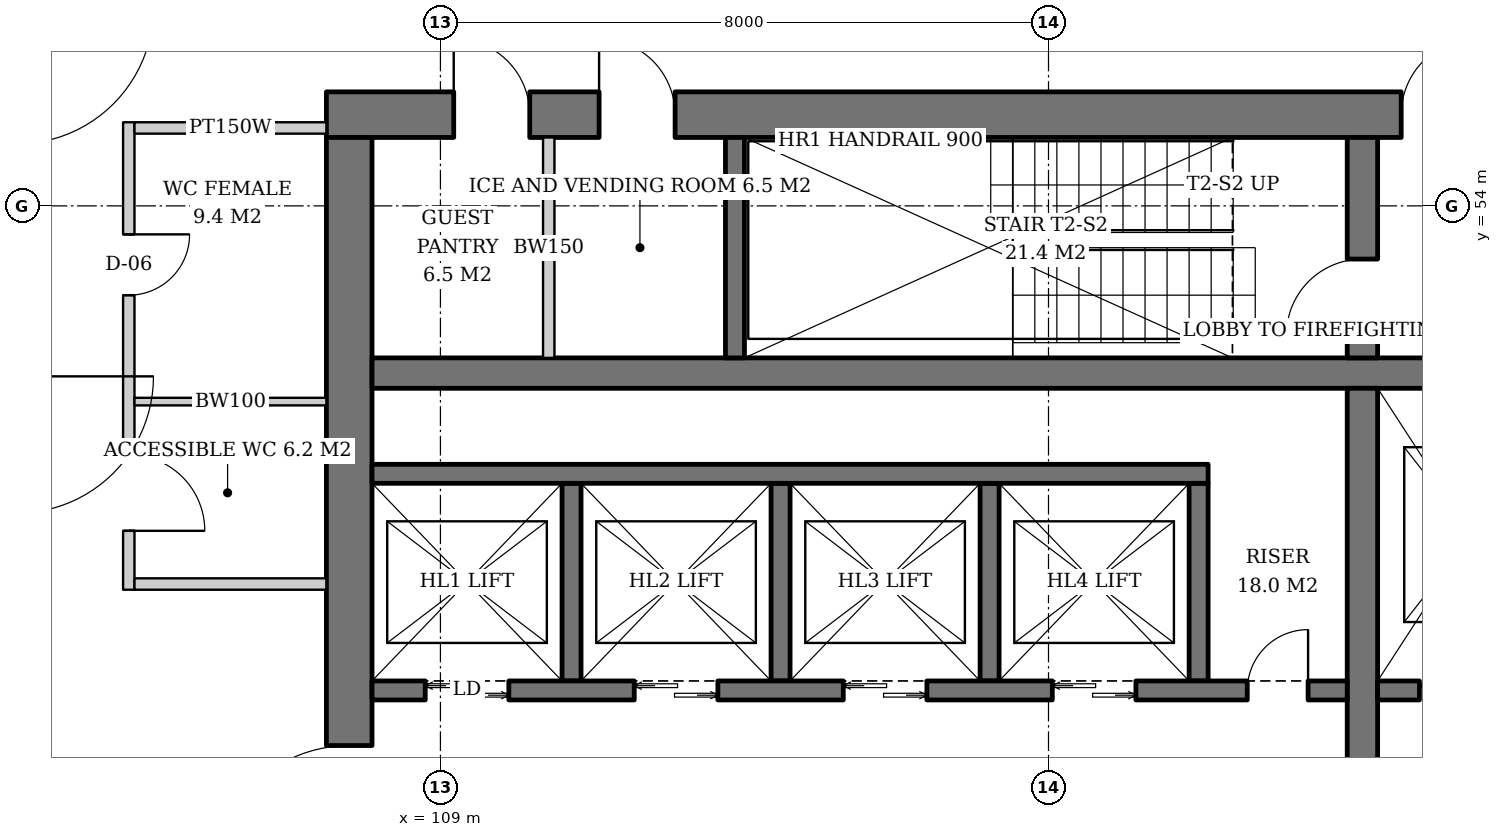
"""IFC4 building model, lengths in metres.
Left out: names, types, materials, properties, quantities, classifications, styles, units other than length and angle.
Written with IfcOpenShell. Run it as: python <this file> out.ifc"""

import sys

from ifc_helpers import new_model, si_unit, direction, frame, frame_2d, origin, place, context, subcontext, project, spatial, rectangle, extrude, element, fill, save


model = new_model("IFC4")
c1 = context("Model", 3, precision=1e-05, world=origin(), true_north=direction((0.0, 1.0)))
c2 = subcontext(c1, "Body", "Model", "MODEL_VIEW")
j1 = project(units=[si_unit("LENGTHUNIT", "METRE"), si_unit("PLANEANGLEUNIT", "RADIAN")], contexts=[c1])
p1 = place(None, origin())
s1 = spatial("IfcSite", under=j1, at=p1, CompositionType="ELEMENT")
p2 = place(p1, origin())
s2 = spatial("IfcBuilding", under=s1, at=p2, CompositionType="ELEMENT")
p3 = place(p2, frame((0.0, 0.0, 21.0)))
s3 = spatial("IfcBuildingStorey", under=s2, at=p3, CompositionType="ELEMENT", Elevation=21.0)
p4 = place(p3, frame((107.5, 55.2, 0.0), z_axis=(0.0, 0.0, 1.0), x_axis=(1.0, 0.0, 0.0)))
e1 = element("IfcWall", 1, at=p4, inside=s3, PredefinedType="SHEAR", context=c2, shape_type="SweptSolid", body=[
    extrude(rectangle(XDim=19.0, YDim=0.6, at=frame_2d((9.5, 0.0))), origin(), (0.0, 0.0, 1.0), 3.8),
])
p5 = place(p4, frame((14.14, 0.0, 0.0)))
e2 = element("IfcOpeningElement", 2, at=p5, cuts=e1, PredefinedType="OPENING", context=c2, shape_type="SweptSolid", body=[
    extrude(rectangle(XDim=1.0, YDim=2.1, at=frame_2d((0.5, 1.05))), frame((0.0, 0.31, 0.0), z_axis=(0.0, -1.0, 0.0), x_axis=(1.0, 0.0, 0.0)), (0.0, 0.0, 1.0), 0.62),
])
p6 = place(p4, frame((1.675, 0.0, 0.0)))
e3 = element("IfcOpeningElement", 3, at=p6, cuts=e1, PredefinedType="OPENING", context=c2, shape_type="SweptSolid", body=[
    extrude(rectangle(XDim=1.0, YDim=2.1, at=frame_2d((0.5, 1.05))), frame((0.0, 0.31, 0.0), z_axis=(0.0, -1.0, 0.0), x_axis=(1.0, 0.0, 0.0)), (0.0, 0.0, 1.0), 0.62),
])
p7 = place(p4, frame((3.587, 0.0, 0.0)))
e4 = element("IfcOpeningElement", 4, at=p7, cuts=e1, PredefinedType="OPENING", context=c2, shape_type="SweptSolid", body=[
    extrude(rectangle(XDim=1.0, YDim=2.1, at=frame_2d((0.5, 1.05))), frame((0.0, 0.31, 0.0), z_axis=(0.0, -1.0, 0.0), x_axis=(1.0, 0.0, 0.0)), (0.0, 0.0, 1.0), 0.62),
])
p8 = place(p3, frame((107.8, 37.1, 0.0), z_axis=(0.0, 0.0, 1.0), x_axis=(0.0, 1.0, 0.0)))
e5 = element("IfcWall", 5, at=p8, inside=s3, PredefinedType="SHEAR", context=c2, shape_type="SweptSolid", body=[
    extrude(rectangle(XDim=17.8, YDim=0.6, at=frame_2d((8.9, 0.0))), origin(), (0.0, 0.0, 1.0), 3.8),
])
p9 = place(p8, frame((8.0, 0.0, 0.0)))
e6 = element("IfcOpeningElement", 6, at=p9, cuts=e5, PredefinedType="OPENING", context=c2, shape_type="SweptSolid", body=[
    extrude(rectangle(XDim=1.8, YDim=2.4, at=frame_2d((0.9, 1.2))), frame((0.0, 0.31, 0.0), z_axis=(0.0, -1.0, 0.0), x_axis=(1.0, 0.0, 0.0)), (0.0, 0.0, 1.0), 0.62),
])
p10 = place(p3, frame((108.1, 51.8, 0.0), z_axis=(0.0, 0.0, 1.0), x_axis=(1.0, 0.0, 0.0)))
e7 = element("IfcWall", 7, at=p10, inside=s3, PredefinedType="SHEAR", context=c2, shape_type="SweptSolid", body=[
    extrude(rectangle(XDim=17.8, YDim=0.4, at=frame_2d((8.9, 0.0))), origin(), (0.0, 0.0, 1.0), 3.8),
])
p11 = place(p3, frame((121.13, 40.4, 0.0), z_axis=(0.0, 0.0, 1.0), x_axis=(0.0, 1.0, 0.0)))
e8 = element("IfcWall", 8, at=p11, inside=s3, PredefinedType="SHEAR", context=c2, shape_type="SweptSolid", body=[
    extrude(rectangle(XDim=11.2, YDim=0.4, at=frame_2d((5.6, 0.0))), origin(), (0.0, 0.0, 1.0), 3.8),
])
p12 = place(p3, frame((121.13, 52.0, 0.0), z_axis=(0.0, 0.0, 1.0), x_axis=(0.0, 1.0, 0.0)))
e9 = element("IfcWall", 9, at=p12, inside=s3, PredefinedType="SHEAR", context=c2, shape_type="SweptSolid", body=[
    extrude(rectangle(XDim=2.9, YDim=0.4, at=frame_2d((1.45, 0.0))), origin(), (0.0, 0.0, 1.0), 3.8),
])
p13 = place(p12, frame((0.3, 0.0, 0.0)))
e10 = element("IfcOpeningElement", 10, at=p13, cuts=e9, PredefinedType="OPENING", context=c2, shape_type="SweptSolid", body=[
    extrude(rectangle(XDim=1.0, YDim=2.1, at=frame_2d((0.5, 1.05))), frame((0.0, 0.21, 0.0), z_axis=(0.0, -1.0, 0.0), x_axis=(1.0, 0.0, 0.0)), (0.0, 0.0, 1.0), 0.42),
])
p14 = place(p3, frame((112.875, 52.0, 0.0), z_axis=(0.0, 0.0, 1.0), x_axis=(0.0, 1.0, 0.0)))
e11 = element("IfcWall", 11, at=p14, inside=s3, PredefinedType="SHEAR", context=c2, shape_type="SweptSolid", body=[
    extrude(rectangle(XDim=2.9, YDim=0.25, at=frame_2d((1.45, 0.0))), origin(), (0.0, 0.0, 1.0), 3.8),
])
for number, where, z_axis, x_axis in (
    (12, (110.725, 47.75, 0.0), (0.0, 0.0, 1.0), (0.0, 1.0, 0.0)),
    (13, (113.475, 47.75, 0.0), (0.0, 0.0, 1.0), (0.0, 1.0, 0.0)),
    (14, (116.225, 47.75, 0.0), (0.0, 0.0, 1.0), (0.0, 1.0, 0.0)),
    (15, (118.975, 47.75, 0.0), (0.0, 0.0, 1.0), (0.0, 1.0, 0.0)),
):
    element("IfcWall", number, at=place(p3, frame(where, z_axis=z_axis, x_axis=x_axis)), inside=s3, PredefinedType="SHEAR", context=c2, shape_type="SweptSolid", body=[
        extrude(rectangle(XDim=2.6, YDim=0.25, at=frame_2d((1.3, 0.0))), origin(), (0.0, 0.0, 1.0), 3.8),
    ])
p15 = place(p3, frame((108.1, 50.475, 0.0), z_axis=(0.0, 0.0, 1.0), x_axis=(1.0, 0.0, 0.0)))
e16 = element("IfcWall", 16, at=p15, inside=s3, PredefinedType="SHEAR", context=c2, shape_type="SweptSolid", body=[
    extrude(rectangle(XDim=11.0, YDim=0.25, at=frame_2d((5.5, 0.0))), origin(), (0.0, 0.0, 1.0), 3.8),
])
p16 = place(p3, frame((108.1, 47.625, 0.0), z_axis=(0.0, 0.0, 1.0), x_axis=(1.0, 0.0, 0.0)))
e17 = element("IfcWall", 17, at=p16, inside=s3, PredefinedType="SHEAR", context=c2, shape_type="SweptSolid", body=[
    extrude(rectangle(XDim=12.83, YDim=0.25, at=frame_2d((6.415, 0.0))), origin(), (0.0, 0.0, 1.0), 3.8),
])
p17 = place(p16, frame((0.7, 0.0, 0.0)))
e18 = element("IfcOpeningElement", 18, at=p17, cuts=e17, PredefinedType="OPENING", context=c2, shape_type="SweptSolid", body=[
    extrude(rectangle(XDim=1.1, YDim=2.2, at=frame_2d((0.55, 1.1))), frame((0.0, 0.135, 0.0), z_axis=(0.0, -1.0, 0.0), x_axis=(1.0, 0.0, 0.0)), (0.0, 0.0, 1.0), 0.27),
])
p18 = place(p16, frame((3.45, 0.0, 0.0)))
e19 = element("IfcOpeningElement", 19, at=p18, cuts=e17, PredefinedType="OPENING", context=c2, shape_type="SweptSolid", body=[
    extrude(rectangle(XDim=1.1, YDim=2.2, at=frame_2d((0.55, 1.1))), frame((0.0, 0.135, 0.0), z_axis=(0.0, -1.0, 0.0), x_axis=(1.0, 0.0, 0.0)), (0.0, 0.0, 1.0), 0.27),
])
p19 = place(p16, frame((6.2, 0.0, 0.0)))
e20 = element("IfcOpeningElement", 20, at=p19, cuts=e17, PredefinedType="OPENING", context=c2, shape_type="SweptSolid", body=[
    extrude(rectangle(XDim=1.1, YDim=2.2, at=frame_2d((0.55, 1.1))), frame((0.0, 0.135, 0.0), z_axis=(0.0, -1.0, 0.0), x_axis=(1.0, 0.0, 0.0)), (0.0, 0.0, 1.0), 0.27),
])
p20 = place(p16, frame((8.95, 0.0, 0.0)))
e21 = element("IfcOpeningElement", 21, at=p20, cuts=e17, PredefinedType="OPENING", context=c2, shape_type="SweptSolid", body=[
    extrude(rectangle(XDim=1.1, YDim=2.2, at=frame_2d((0.55, 1.1))), frame((0.0, 0.135, 0.0), z_axis=(0.0, -1.0, 0.0), x_axis=(1.0, 0.0, 0.0)), (0.0, 0.0, 1.0), 0.27),
])
p21 = place(p16, frame((11.515, 0.0, 0.0)))
e22 = element("IfcOpeningElement", 22, at=p21, cuts=e17, PredefinedType="OPENING", context=c2, shape_type="SweptSolid", body=[
    extrude(rectangle(XDim=0.8, YDim=2.0, at=frame_2d((0.4, 1.0))), frame((0.0, 0.135, 0.0), z_axis=(0.0, -1.0, 0.0), x_axis=(1.0, 0.0, 0.0)), (0.0, 0.0, 1.0), 0.27),
])
p22 = place(p3, frame((121.33, 47.625, 0.0), z_axis=(0.0, 0.0, 1.0), x_axis=(1.0, 0.0, 0.0)))
e23 = element("IfcWall", 23, at=p22, inside=s3, PredefinedType="SHEAR", context=c2, shape_type="SweptSolid", body=[
    extrude(rectangle(XDim=4.57, YDim=0.25, at=frame_2d((2.285, 0.0))), origin(), (0.0, 0.0, 1.0), 3.8),
])
p23 = place(p22, frame((0.55, 0.0, 0.0)))
e24 = element("IfcOpeningElement", 24, at=p23, cuts=e23, PredefinedType="OPENING", context=c2, shape_type="SweptSolid", body=[
    extrude(rectangle(XDim=1.4, YDim=2.4, at=frame_2d((0.7, 1.2))), frame((0.0, 0.135, 0.0), z_axis=(0.0, -1.0, 0.0), x_axis=(1.0, 0.0, 0.0)), (0.0, 0.0, 1.0), 0.27),
])
p24 = place(p22, frame((3.26, 0.0, 0.0)))
e25 = element("IfcOpeningElement", 25, at=p24, cuts=e23, PredefinedType="OPENING", context=c2, shape_type="SweptSolid", body=[
    extrude(rectangle(XDim=0.8, YDim=2.0, at=frame_2d((0.4, 1.0))), frame((0.0, 0.135, 0.0), z_axis=(0.0, -1.0, 0.0), x_axis=(1.0, 0.0, 0.0)), (0.0, 0.0, 1.0), 0.27),
])
p25 = place(p3, frame((110.425, 52.0, 0.0), z_axis=(0.0, 0.0, 1.0), x_axis=(0.0, 1.0, 0.0)))
e26 = element("IfcWall", 26, at=p25, inside=s3, PredefinedType="SOLIDWALL", context=c2, shape_type="SweptSolid", body=[
    extrude(rectangle(XDim=2.9, YDim=0.15, at=frame_2d((1.45, 0.0))), origin(), (0.0, 0.0, 1.0), 3.6),
])
p26 = place(p3, frame((104.9, 55.1, 0.0), z_axis=(0.0, 0.0, 1.0), x_axis=(0.0, -1.0, 0.0)))
e27 = element("IfcWall", 27, at=p26, inside=s3, PredefinedType="PARTITIONING", context=c2, shape_type="SweptSolid", body=[
    extrude(rectangle(XDim=6.15, YDim=0.15, at=frame_2d((3.075, 0.0))), origin(), (0.0, 0.0, 1.0), 2.8),
])
p27 = place(p26, frame((1.475, 0.0, 0.0)))
e28 = element("IfcOpeningElement", 28, at=p27, cuts=e27, PredefinedType="OPENING", context=c2, shape_type="SweptSolid", body=[
    extrude(rectangle(XDim=0.8, YDim=2.1, at=frame_2d((0.4, 1.05))), frame((0.0, 0.085, 0.0), z_axis=(0.0, -1.0, 0.0), x_axis=(1.0, 0.0, 0.0)), (0.0, 0.0, 1.0), 0.17),
])
p28 = place(p26, frame((4.375, 0.0, 0.0)))
e29 = element("IfcOpeningElement", 29, at=p28, cuts=e27, PredefinedType="OPENING", context=c2, shape_type="SweptSolid", body=[
    extrude(rectangle(XDim=1.0, YDim=2.1, at=frame_2d((0.5, 1.05))), frame((0.0, 0.085, 0.0), z_axis=(0.0, -1.0, 0.0), x_axis=(1.0, 0.0, 0.0)), (0.0, 0.0, 1.0), 0.17),
])
p29 = place(p3, frame((104.975, 55.025, 0.0), z_axis=(0.0, 0.0, 1.0), x_axis=(1.0, 0.0, 0.0)))
e30 = element("IfcWall", 30, at=p29, inside=s3, PredefinedType="PARTITIONING", context=c2, shape_type="SweptSolid", body=[
    extrude(rectangle(XDim=2.525, YDim=0.15, at=frame_2d((1.262, 0.0))), origin(), (0.0, 0.0, 1.0), 2.8),
])
p30 = place(p3, frame((104.975, 51.425, 0.0), z_axis=(0.0, 0.0, 1.0), x_axis=(1.0, 0.0, 0.0)))
e31 = element("IfcWall", 31, at=p30, inside=s3, PredefinedType="SOLIDWALL", context=c2, shape_type="SweptSolid", body=[
    extrude(rectangle(XDim=2.525, YDim=0.1, at=frame_2d((1.262, 0.0))), origin(), (0.0, 0.0, 1.0), 3.6),
])
p31 = place(p3, frame((104.975, 49.025, 0.0), z_axis=(0.0, 0.0, 1.0), x_axis=(1.0, 0.0, 0.0)))
e32 = element("IfcWall", 32, at=p31, inside=s3, PredefinedType="PARTITIONING", context=c2, shape_type="SweptSolid", body=[
    extrude(rectangle(XDim=2.525, YDim=0.15, at=frame_2d((1.262, 0.0))), origin(), (0.0, 0.0, 1.0), 3.6),
])
p32 = place(p17, origin())
e33 = element("IfcDoor", 33, at=p32, inside=s3, OperationType="DOUBLE_DOOR_SLIDING", PredefinedType="DOOR", context=c2, shape_type="SweptSolid", body=[
    extrude(rectangle(XDim=1.1, YDim=2.2, at=frame_2d((0.55, 1.1))), frame((0.0, 0.025, 0.0), z_axis=(0.0, -1.0, 0.0), x_axis=(1.0, 0.0, 0.0)), (0.0, 0.0, 1.0), 0.05),
])
fill(e18, e33)
p33 = place(p18, origin())
e34 = element("IfcDoor", 34, at=p33, inside=s3, OperationType="DOUBLE_DOOR_SLIDING", PredefinedType="DOOR", context=c2, shape_type="SweptSolid", body=[
    extrude(rectangle(XDim=1.1, YDim=2.2, at=frame_2d((0.55, 1.1))), frame((0.0, 0.025, 0.0), z_axis=(0.0, -1.0, 0.0), x_axis=(1.0, 0.0, 0.0)), (0.0, 0.0, 1.0), 0.05),
])
fill(e19, e34)
p34 = place(p19, origin())
e35 = element("IfcDoor", 35, at=p34, inside=s3, OperationType="DOUBLE_DOOR_SLIDING", PredefinedType="DOOR", context=c2, shape_type="SweptSolid", body=[
    extrude(rectangle(XDim=1.1, YDim=2.2, at=frame_2d((0.55, 1.1))), frame((0.0, 0.025, 0.0), z_axis=(0.0, -1.0, 0.0), x_axis=(1.0, 0.0, 0.0)), (0.0, 0.0, 1.0), 0.05),
])
fill(e20, e35)
p35 = place(p20, origin())
e36 = element("IfcDoor", 36, at=p35, inside=s3, OperationType="DOUBLE_DOOR_SLIDING", PredefinedType="DOOR", context=c2, shape_type="SweptSolid", body=[
    extrude(rectangle(XDim=1.1, YDim=2.2, at=frame_2d((0.55, 1.1))), frame((0.0, 0.025, 0.0), z_axis=(0.0, -1.0, 0.0), x_axis=(1.0, 0.0, 0.0)), (0.0, 0.0, 1.0), 0.05),
])
fill(e21, e36)
p36 = place(p21, origin())
e37 = element("IfcDoor", 37, at=p36, inside=s3, OperationType="SINGLE_SWING_RIGHT", PredefinedType="DOOR", context=c2, shape_type="SweptSolid", body=[
    extrude(rectangle(XDim=0.8, YDim=2.0, at=frame_2d((0.4, 1.0))), frame((0.0, 0.025, 0.0), z_axis=(0.0, -1.0, 0.0), x_axis=(1.0, 0.0, 0.0)), (0.0, 0.0, 1.0), 0.05),
])
fill(e22, e37)
p37 = place(p23, origin())
e38 = element("IfcDoor", 38, at=p37, inside=s3, OperationType="DOUBLE_DOOR_SLIDING", PredefinedType="DOOR", context=c2, shape_type="SweptSolid", body=[
    extrude(rectangle(XDim=1.4, YDim=2.4, at=frame_2d((0.7, 1.2))), frame((0.0, 0.025, 0.0), z_axis=(0.0, -1.0, 0.0), x_axis=(1.0, 0.0, 0.0)), (0.0, 0.0, 1.0), 0.05),
])
fill(e24, e38)
p38 = place(p13, origin())
e39 = element("IfcDoor", 39, at=p38, inside=s3, OperationType="SINGLE_SWING_LEFT", PredefinedType="DOOR", context=c2, shape_type="SweptSolid", body=[
    extrude(rectangle(XDim=1.0, YDim=2.1, at=frame_2d((0.5, 1.05))), frame((0.0, 0.025, 0.0), z_axis=(0.0, -1.0, 0.0), x_axis=(1.0, 0.0, 0.0)), (0.0, 0.0, 1.0), 0.05),
])
fill(e10, e39)
p39 = place(p5, origin())
e40 = element("IfcDoor", 40, at=p39, inside=s3, OperationType="SINGLE_SWING_RIGHT", PredefinedType="DOOR", context=c2, shape_type="SweptSolid", body=[
    extrude(rectangle(XDim=1.0, YDim=2.1, at=frame_2d((0.5, 1.05))), frame((0.0, 0.025, 0.0), z_axis=(0.0, -1.0, 0.0), x_axis=(1.0, 0.0, 0.0)), (0.0, 0.0, 1.0), 0.05),
])
fill(e2, e40)
p40 = place(p9, origin())
e41 = element("IfcDoor", 41, at=p40, inside=s3, OperationType="DOUBLE_DOOR_SINGLE_SWING", PredefinedType="DOOR", context=c2, shape_type="SweptSolid", body=[
    extrude(rectangle(XDim=1.8, YDim=2.4, at=frame_2d((0.9, 1.2))), frame((0.0, 0.025, 0.0), z_axis=(0.0, -1.0, 0.0), x_axis=(1.0, 0.0, 0.0)), (0.0, 0.0, 1.0), 0.05),
])
fill(e6, e41)
p41 = place(p6, origin())
e42 = element("IfcDoor", 42, at=p41, inside=s3, OperationType="SINGLE_SWING_LEFT", PredefinedType="DOOR", context=c2, shape_type="SweptSolid", body=[
    extrude(rectangle(XDim=1.0, YDim=2.1, at=frame_2d((0.5, 1.05))), frame((0.0, -0.24, 0.0), z_axis=(0.0, -1.0, 0.0), x_axis=(1.0, 0.0, 0.0)), (0.0, 0.0, 1.0), 0.05),
])
fill(e3, e42)
p42 = place(p7, origin())
e43 = element("IfcDoor", 43, at=p42, inside=s3, OperationType="SINGLE_SWING_LEFT", PredefinedType="DOOR", context=c2, shape_type="SweptSolid", body=[
    extrude(rectangle(XDim=1.0, YDim=2.1, at=frame_2d((0.5, 1.05))), frame((0.0, -0.24, 0.0), z_axis=(0.0, -1.0, 0.0), x_axis=(1.0, 0.0, 0.0)), (0.0, 0.0, 1.0), 0.05),
])
fill(e4, e43)
p43 = place(p27, origin())
e44 = element("IfcDoor", 44, at=p43, inside=s3, OperationType="SINGLE_SWING_LEFT", PredefinedType="DOOR", context=c2, shape_type="SweptSolid", body=[
    extrude(rectangle(XDim=0.8, YDim=2.1, at=frame_2d((0.4, 1.05))), frame((0.0, 0.025, 0.0), z_axis=(0.0, -1.0, 0.0), x_axis=(1.0, 0.0, 0.0)), (0.0, 0.0, 1.0), 0.05),
])
fill(e28, e44)
p44 = place(p28, origin())
e45 = element("IfcDoor", 45, at=p44, inside=s3, OperationType="SINGLE_SWING_RIGHT", PredefinedType="DOOR", context=c2, shape_type="SweptSolid", body=[
    extrude(rectangle(XDim=1.0, YDim=2.1, at=frame_2d((0.5, 1.05))), frame((0.0, 0.025, 0.0), z_axis=(0.0, -1.0, 0.0), x_axis=(1.0, 0.0, 0.0)), (0.0, 0.0, 1.0), 0.05),
])
fill(e29, e45)
save(model, sys.argv[1])
